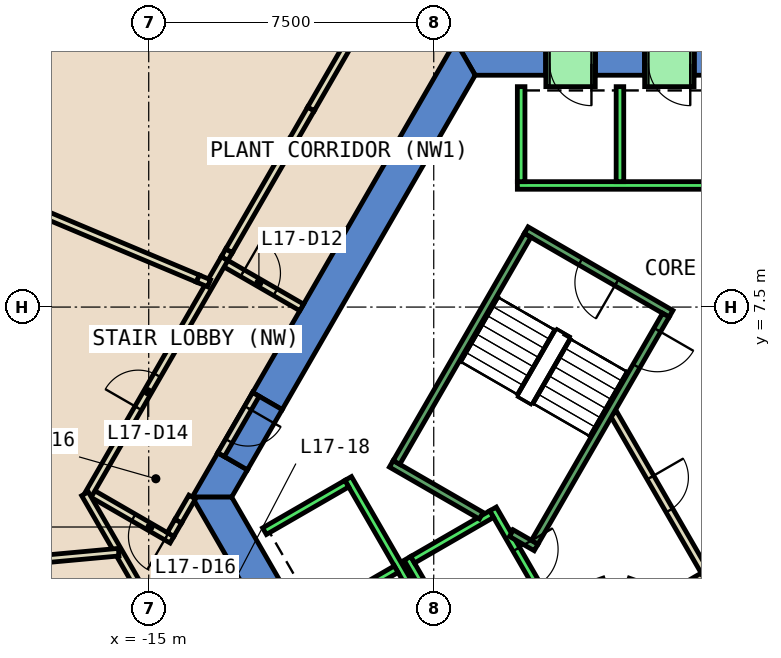
"""IFC4 building model, lengths in metres.
Left out: names, types, materials, properties, quantities, classifications, styles, units other than length and angle.
Written with IfcOpenShell. Run it as: python <this file> out.ifc"""

import sys

from ifc_helpers import new_model, si_unit, direction, frame, frame_2d, origin, place, context, subcontext, project, spatial, polyline, rectangle, outline, extrude, element, fill, save


model = new_model("IFC4")
c1 = context("Model", 3, precision=1e-05, world=origin(), true_north=direction((0.0, 1.0)))
c2 = subcontext(c1, "Body", "Model", "MODEL_VIEW")
j1 = project(units=[si_unit("LENGTHUNIT", "METRE"), si_unit("PLANEANGLEUNIT", "RADIAN")], contexts=[c1])
p1 = place(None, origin())
s1 = spatial("IfcSite", under=j1, at=p1, CompositionType="ELEMENT")
p2 = place(p1, origin())
s2 = spatial("IfcBuilding", under=s1, at=p2, CompositionType="ELEMENT")
p3 = place(p2, frame((0.0, 0.0, 81.2)))
s3 = spatial("IfcBuildingStorey", under=s2, at=p3, CompositionType="ELEMENT", Elevation=81.2)
p4 = place(p3, frame((0.0, 0.0, -0.6)))
e1 = element("IfcWall", 1, at=p4, inside=s3, PredefinedType="SHEAR", context=c2, shape_type="SweptSolid", body=[
    extrude(outline(polyline([(-0.65, 14.5), (-0.65, 13.6), (0.65, 13.6), (0.65, 14.5), (-0.65, 14.5)])), origin(), (0.0, 0.0, 1.0), 5.4),
])
p5 = place(p3, frame((0.0, 0.0, -0.6)))
e2 = element("IfcWall", 2, at=p5, inside=s3, PredefinedType="SHEAR", context=c2, shape_type="SweptSolid", body=[
    extrude(outline(polyline([(-3.25, 14.5), (-3.25, 13.6), (-1.95, 13.6), (-1.95, 14.5), (-3.25, 14.5)])), origin(), (0.0, 0.0, 1.0), 5.4),
])
p6 = place(p3, frame((0.0, 0.0, -0.6)))
e3 = element("IfcWall", 3, at=p6, inside=s3, PredefinedType="SHEAR", context=c2, shape_type="SweptSolid", body=[
    extrude(outline(polyline([(-4.55, 13.6), (-4.55, 14.5), (-6.928, 14.5), (-6.409, 13.6), (-4.55, 13.6)])), origin(), (0.0, 0.0, 1.0), 5.4),
])
p7 = place(p3, frame((0.0, 0.0, 3.6)))
e4 = element("IfcWall", 4, at=p7, inside=s3, PredefinedType="SHEAR", context=c2, shape_type="SweptSolid", body=[
    extrude(outline(polyline([(-1.95, 14.5), (-1.95, 13.6), (-0.65, 13.6), (-0.65, 14.5), (-1.95, 14.5)])), origin(), (0.0, 0.0, 1.0), 1.2),
])
p8 = place(p3, frame((0.0, 0.0, 3.6)))
e5 = element("IfcWall", 5, at=p8, inside=s3, PredefinedType="SHEAR", context=c2, shape_type="SweptSolid", body=[
    extrude(outline(polyline([(-4.55, 14.5), (-4.55, 13.6), (-3.25, 13.6), (-3.25, 14.5), (-4.55, 14.5)])), origin(), (0.0, 0.0, 1.0), 1.2),
])
p9 = place(p3, frame((0.0, 0.0, -0.6)))
e6 = element("IfcWall", 6, at=p9, inside=s3, PredefinedType="SHEAR", context=c2, shape_type="SweptSolid", body=[
    extrude(outline(polyline([(-12.267, 5.252), (-11.488, 4.802), (-6.409, 13.6), (-6.928, 14.5), (-12.267, 5.252)])), origin(), (0.0, 0.0, 1.0), 5.4),
])
p10 = place(p3, frame((0.0, 0.0, -0.6)))
e7 = element("IfcWall", 7, at=p10, inside=s3, PredefinedType="SHEAR", context=c2, shape_type="SweptSolid", body=[
    extrude(outline(polyline([(-12.403, 3.217), (-13.182, 3.667), (-13.856, 2.5), (-12.817, 2.5), (-12.403, 3.217)])), origin(), (0.0, 0.0, 1.0), 5.4),
])
p11 = place(p3, frame((0.0, 0.0, 3.6)))
e8 = element("IfcWall", 8, at=p11, inside=s3, PredefinedType="SHEAR", context=c2, shape_type="SweptSolid", body=[
    extrude(outline(polyline([(-13.182, 3.667), (-12.403, 3.217), (-11.488, 4.802), (-12.267, 5.252), (-13.182, 3.667)])), origin(), (0.0, 0.0, 1.0), 1.2),
])
p12 = place(p3, frame((0.0, 0.0, -0.6)))
e9 = element("IfcWall", 9, at=p12, inside=s3, PredefinedType="SHEAR", context=c2, shape_type="SweptSolid", body=[
    extrude(outline(polyline([(-13.856, 2.5), (-6.928, -9.5), (-6.409, -8.6), (-12.817, 2.5), (-13.856, 2.5)])), origin(), (0.0, 0.0, 1.0), 5.4),
])
p13 = place(p3, frame((-0.52, -1.0, 0.0), z_axis=(0.0, 0.0, 1.0), x_axis=(0.50011622646, 0.865958290007, 0.0)))
e10 = element("IfcWall", 10, at=p13, inside=s3, PredefinedType="PARTITIONING", context=c2, shape_type="SweptSolid", body=[
    extrude(rectangle(XDim=4.991, YDim=0.2, at=frame_2d((2.496, 0.0))), origin(), (0.0, 0.0, 1.0), 4.8),
])
p14 = place(p13, frame((1.945, 0.0, 0.0)))
e11 = element("IfcOpeningElement", 11, at=p14, cuts=e10, PredefinedType="OPENING", context=c2, shape_type="SweptSolid", body=[
    extrude(rectangle(XDim=1.0, YDim=2.1, at=frame_2d((0.5, 1.05))), frame((0.0, 0.11, 0.0), z_axis=(0.0, -1.0, 0.0), x_axis=(1.0, 0.0, 0.0)), (0.0, 0.0, 1.0), 0.22),
])
p15 = place(p3, frame((-0.412, 0.414, 0.0), z_axis=(0.0, 0.0, 1.0), x_axis=(-0.866017369001, -0.500013916395, 0.0)))
e12 = element("IfcWall", 12, at=p15, inside=s3, PredefinedType="PARTITIONING", context=c2, shape_type="SweptSolid", body=[
    extrude(rectangle(XDim=1.45, YDim=0.2, at=frame_2d((0.725, 0.0))), origin(), (0.0, 0.0, 1.0), 4.8),
])
p16 = place(p3, frame((-2.07, 0.16, 0.0), z_axis=(0.0, 0.0, 1.0), x_axis=(-0.942199461132, 0.335052496547, 0.0)))
e13 = element("IfcWall", 13, at=p16, inside=s3, PredefinedType="PARTITIONING", context=c2, shape_type="SweptSolid", body=[
    extrude(rectangle(XDim=0.337, YDim=0.2, at=frame_2d((0.169, 0.0))), origin(), (0.0, 0.0, 1.0), 4.8),
])
p17 = place(p3, frame((-3.012, 0.273, 0.0), z_axis=(0.0, 0.0, 1.0), x_axis=(-0.942280615813, -0.334824194261, 0.0)))
e14 = element("IfcWall", 14, at=p17, inside=s3, PredefinedType="PARTITIONING", context=c2, shape_type="SweptSolid", body=[
    extrude(rectangle(XDim=0.338, YDim=0.2, at=frame_2d((0.169, 0.0))), origin(), (0.0, 0.0, 1.0), 4.8),
])
p18 = place(p3, frame((-2.771, 4.7, 0.0), z_axis=(0.0, 0.0, 1.0), x_axis=(0.499969479948, -0.866043023828, 0.0)))
e15 = element("IfcWall", 15, at=p18, inside=s3, PredefinedType="PARTITIONING", context=c2, shape_type="SweptSolid", body=[
    extrude(rectangle(XDim=4.99, YDim=0.2, at=frame_2d((2.495, 0.0))), origin(), (0.0, 0.0, 1.0), 4.8),
])
p19 = place(p18, frame((1.945, 0.0, 0.0)))
e16 = element("IfcOpeningElement", 16, at=p19, cuts=e15, PredefinedType="OPENING", context=c2, shape_type="SweptSolid", body=[
    extrude(rectangle(XDim=1.0, YDim=2.1, at=frame_2d((0.5, 1.05))), frame((0.0, 0.11, 0.0), z_axis=(0.0, -1.0, 0.0), x_axis=(1.0, 0.0, 0.0)), (0.0, 0.0, 1.0), 0.22),
])
p20 = place(p3, frame((-13.053, 8.691, 0.0), z_axis=(0.0, 0.0, 1.0), x_axis=(0.865973769406, -0.500089422704, 0.0)))
e17 = element("IfcWall", 17, at=p20, inside=s3, PredefinedType="PARTITIONING", context=c2, shape_type="SweptSolid", body=[
    extrude(rectangle(XDim=2.399, YDim=0.2, at=frame_2d((1.2, 0.0))), origin(), (0.0, 0.0, 1.0), 2.4),
])
p21 = place(p20, frame((0.6, 0.0, 0.0)))
e18 = element("IfcOpeningElement", 18, at=p21, cuts=e17, PredefinedType="OPENING", context=c2, shape_type="SweptSolid", body=[
    extrude(rectangle(XDim=1.0, YDim=2.1, at=frame_2d((0.5, 1.05))), frame((0.0, 0.11, 0.0), z_axis=(0.0, -1.0, 0.0), x_axis=(1.0, 0.0, 0.0)), (0.0, 0.0, 1.0), 0.22),
])
p22 = place(p3, frame((-13.856, 2.501, 0.0), z_axis=(0.0, 0.0, 1.0), x_axis=(-0.500327511442, -0.865836232376, 0.0)))
e19 = element("IfcWall", 19, at=p22, inside=s3, PredefinedType="PARTITIONING", context=c2, shape_type="SweptSolid", body=[
    extrude(rectangle(XDim=0.733, YDim=0.2, at=frame_2d((0.367, 0.0))), origin(), (0.0, 0.0, 1.0), 4.8),
])
p23 = place(p3, frame((-14.388, 1.379, 0.0), z_axis=(0.0, 0.0, 1.0), x_axis=(-0.866022959057, 0.500004234368, 0.0)))
e20 = element("IfcWall", 20, at=p23, inside=s3, PredefinedType="PARTITIONING", context=c2, shape_type="SweptSolid", body=[
    extrude(rectangle(XDim=2.5, YDim=0.2, at=frame_2d((1.25, 0.0))), origin(), (0.0, 0.0, 1.0), 4.8),
])
p24 = place(p23, frame((0.168, 0.0, 0.0)))
e21 = element("IfcOpeningElement", 21, at=p24, cuts=e20, PredefinedType="OPENING", context=c2, shape_type="SweptSolid", body=[
    extrude(rectangle(XDim=1.0, YDim=2.1, at=frame_2d((0.5, 1.05))), frame((0.0, 0.11, 0.0), z_axis=(0.0, -1.0, 0.0), x_axis=(1.0, 0.0, 0.0)), (0.0, 0.0, 1.0), 0.22),
])
p25 = place(p3, frame((-16.603, 2.542, 0.0), z_axis=(0.0, 0.0, 1.0), x_axis=(0.499968011863, 0.866043871356, 0.0)))
e22 = element("IfcWall", 22, at=p25, inside=s3, PredefinedType="PARTITIONING", context=c2, shape_type="SweptSolid", body=[
    extrude(rectangle(XDim=7.201, YDim=0.2, at=frame_2d((3.6, 0.0))), origin(), (0.0, 0.0, 1.0), 4.8),
])
p26 = place(p25, frame((2.654, 0.0, 0.0)))
e23 = element("IfcOpeningElement", 23, at=p26, cuts=e22, PredefinedType="OPENING", context=c2, shape_type="SweptSolid", body=[
    extrude(rectangle(XDim=1.0, YDim=2.1, at=frame_2d((0.5, 1.05))), frame((0.0, 0.11, 0.0), z_axis=(0.0, -1.0, 0.0), x_axis=(1.0, 0.0, 0.0)), (0.0, 0.0, 1.0), 0.22),
])
p27 = place(p3, frame((-13.003, 8.778, 0.0), z_axis=(0.0, 0.0, 1.0), x_axis=(0.49939147885, 0.866376448694, 0.0)))
e24 = element("IfcWall", 24, at=p27, inside=s3, PredefinedType="PARTITIONING", context=c2, shape_type="SweptSolid", body=[
    extrude(rectangle(XDim=0.234, YDim=0.2, at=frame_2d((0.117, 0.0))), origin(), (0.0, 0.0, 1.0), 2.4),
])
p28 = place(p3, frame((-12.471, -4.7, 0.0), z_axis=(0.0, 0.0, 1.0), x_axis=(-0.49990916997, 0.866077838176, 0.0)))
e25 = element("IfcWall", 25, at=p28, inside=s3, PredefinedType="PARTITIONING", context=c2, shape_type="SweptSolid", body=[
    extrude(rectangle(XDim=8.414, YDim=0.2, at=frame_2d((4.207, 0.0))), origin(), (0.0, 0.0, 1.0), 4.8),
])
p29 = place(p28, frame((4.362, 0.0, 0.0)))
e26 = element("IfcOpeningElement", 26, at=p29, cuts=e25, PredefinedType="OPENING", context=c2, shape_type="SweptSolid", body=[
    extrude(rectangle(XDim=1.0, YDim=2.1, at=frame_2d((0.5, 1.05))), frame((0.0, 0.11, 0.0), z_axis=(0.0, -1.0, 0.0), x_axis=(1.0, 0.0, 0.0)), (0.0, 0.0, 1.0), 0.22),
])
p30 = place(p3, frame((-15.791, 1.051, 0.0), z_axis=(0.0, 0.0, 1.0), x_axis=(-0.99580964223, -0.091450294928, 0.0)))
e27 = element("IfcWall", 27, at=p30, inside=s3, PredefinedType="PARTITIONING", context=c2, shape_type="SweptSolid", body=[
    extrude(rectangle(XDim=18.557, YDim=0.2, at=frame_2d((9.278, 0.0))), origin(), (0.0, 0.0, 1.0), 2.4),
])
p31 = place(p3, frame((-12.181, 5.202, 0.0), z_axis=(0.0, 0.0, 1.0), x_axis=(-0.500215337403, -0.865901042976, 0.0)))
e28 = element("IfcWall", 28, at=p31, inside=s3, PredefinedType="PARTITIONING", context=c2, shape_type="SweptSolid", body=[
    extrude(rectangle(XDim=1.829, YDim=0.2, at=frame_2d((0.915, 0.0))), origin(), (0.0, 0.0, 1.0), 2.4),
])
p32 = place(p31, frame((0.415, 0.0, 0.0)))
e29 = element("IfcOpeningElement", 29, at=p32, cuts=e28, PredefinedType="OPENING", context=c2, shape_type="SweptSolid", body=[
    extrude(rectangle(XDim=1.0, YDim=2.1, at=frame_2d((0.5, 1.05))), frame((0.0, 0.11, 0.0), z_axis=(0.0, -1.0, 0.0), x_axis=(1.0, 0.0, 0.0)), (0.0, 0.0, 1.0), 0.22),
])
p33 = place(p3, frame((-14.223, 1.866, 0.0), z_axis=(0.0, 0.0, 1.0), x_axis=(-0.500297731093, -0.865853440406, 0.0)))
e30 = element("IfcWall", 30, at=p33, inside=s3, PredefinedType="PARTITIONING", context=c2, shape_type="SweptSolid", body=[
    extrude(rectangle(XDim=0.404, YDim=0.2, at=frame_2d((0.202, 0.0))), origin(), (0.0, 0.0, 1.0), 2.4),
])
p34 = place(p3, frame((-12.886, 8.981, 0.0), z_axis=(0.0, 0.0, 1.0), x_axis=(0.500018952895, 0.866014461049, 0.0)))
e31 = element("IfcWall", 31, at=p34, inside=s3, PredefinedType="PARTITIONING", context=c2, shape_type="SweptSolid", body=[
    extrude(rectangle(XDim=3.35, YDim=0.2, at=frame_2d((1.675, 0.0))), origin(), (0.0, 0.0, 1.0), 4.8),
])
p35 = place(p3, frame((-11.211, 11.882, 0.0), z_axis=(0.0, 0.0, 1.0), x_axis=(0.499693115345, 0.866202511239, 0.0)))
e32 = element("IfcWall", 32, at=p35, inside=s3, PredefinedType="PARTITIONING", context=c2, shape_type="SweptSolid", body=[
    extrude(rectangle(XDim=0.96, YDim=0.2, at=frame_2d((0.48, 0.0))), origin(), (0.0, 0.0, 1.0), 2.4),
])
p36 = place(p3, frame((-10.731, 12.714, 0.0), z_axis=(0.0, 0.0, 1.0), x_axis=(0.500043078269, 0.866000531106, 0.0)))
e33 = element("IfcWall", 33, at=p36, inside=s3, PredefinedType="PARTITIONING", context=c2, shape_type="SweptSolid", body=[
    extrude(rectangle(XDim=3.296, YDim=0.2, at=frame_2d((1.648, 0.0))), origin(), (0.0, 0.0, 1.0), 4.8),
])
p37 = place(p3, frame((-25.73, 13.293, 0.0), z_axis=(0.0, 0.0, 1.0), x_axis=(0.922164650021, -0.386797567535, 0.0)))
e34 = element("IfcWall", 34, at=p37, inside=s3, PredefinedType="PARTITIONING", context=c2, shape_type="SweptSolid", body=[
    extrude(rectangle(XDim=13.038, YDim=0.2, at=frame_2d((6.519, 0.0))), origin(), (0.0, 0.0, 1.0), 4.8),
])
p38 = place(p3, frame((-13.707, 8.25, 0.0), z_axis=(0.0, 0.0, 1.0), x_axis=(0.921982105607, -0.387232484355, 0.0)))
e35 = element("IfcWall", 35, at=p38, inside=s3, PredefinedType="PARTITIONING", context=c2, shape_type="SweptSolid", body=[
    extrude(rectangle(XDim=0.318, YDim=0.2, at=frame_2d((0.159, 0.0))), origin(), (0.0, 0.0, 1.0), 2.4),
])
p39 = place(p3, frame((5.3, 10.7, 0.0), z_axis=(0.0, 0.0, 1.0), x_axis=(-1.0, 0.0, 0.0)))
e36 = element("IfcWall", 36, at=p39, inside=s3, PredefinedType="STANDARD", context=c2, shape_type="SweptSolid", body=[
    extrude(rectangle(XDim=10.6, YDim=0.2, at=frame_2d((5.3, 0.0))), origin(), (0.0, 0.0, 1.0), 4.8),
])
for number, where, z_axis, x_axis in (
    (37, (-2.6, 10.8, 0.0), (0.0, 0.0, 1.0), (0.0, 1.0, 0.0)),
    (38, (-5.2, 10.8, 0.0), (0.0, 0.0, 1.0), (0.0, 1.0, 0.0)),
):
    element("IfcWall", number, at=place(p3, frame(where, z_axis=z_axis, x_axis=x_axis)), inside=s3, PredefinedType="STANDARD", context=c2, shape_type="SweptSolid", body=[
        extrude(rectangle(XDim=2.5, YDim=0.2, at=frame_2d((1.25, 0.0))), origin(), (0.0, 0.0, 1.0), 4.8),
    ])
p40 = place(p3, frame((-5.94, 2.188, 0.0), z_axis=(0.0, 0.0, 1.0), x_axis=(0.49994636267, -0.866056369097, 0.0)))
e39 = element("IfcWall", 39, at=p40, inside=s3, PredefinedType="STANDARD", context=c2, shape_type="SweptSolid", body=[
    extrude(rectangle(XDim=2.8, YDim=0.2, at=frame_2d((1.4, 0.0))), origin(), (0.0, 0.0, 1.0), 4.8),
])
p41 = place(p40, frame((1.225, 0.0, 0.0)))
e40 = element("IfcOpeningElement", 40, at=p41, cuts=e39, PredefinedType="OPENING", context=c2, shape_type="SweptSolid", body=[
    extrude(rectangle(XDim=1.1, YDim=2.1, at=frame_2d((0.55, 1.05))), frame((0.0, 0.11, 0.0), z_axis=(0.0, -1.0, 0.0), x_axis=(1.0, 0.0, 0.0)), (0.0, 0.0, 1.0), 0.22),
])
p42 = place(p3, frame((-8.192, 0.888, 0.0), z_axis=(0.0, 0.0, 1.0), x_axis=(0.49994636267, -0.866056369097, 0.0)))
e41 = element("IfcWall", 41, at=p42, inside=s3, PredefinedType="STANDARD", context=c2, shape_type="SweptSolid", body=[
    extrude(rectangle(XDim=2.8, YDim=0.2, at=frame_2d((1.4, 0.0))), origin(), (0.0, 0.0, 1.0), 4.8),
])
p43 = place(p3, frame((-5.977, 2.052, 0.0), z_axis=(0.0, 0.0, 1.0), x_axis=(-0.865973769406, -0.500089422704, 0.0)))
e42 = element("IfcWall", 42, at=p43, inside=s3, PredefinedType="STANDARD", context=c2, shape_type="SweptSolid", body=[
    extrude(rectangle(XDim=2.399, YDim=0.2, at=frame_2d((1.2, 0.0))), origin(), (0.0, 0.0, 1.0), 4.8),
])
p44 = place(p3, frame((-9.751, 2.99, 0.0), z_axis=(0.0, 0.0, 1.0), x_axis=(0.50000090737, -0.866024879913, 0.0)))
e43 = element("IfcWall", 43, at=p44, inside=s3, PredefinedType="STANDARD", context=c2, shape_type="SweptSolid", body=[
    extrude(rectangle(XDim=10.6, YDim=0.2, at=frame_2d((5.3, 0.0))), origin(), (0.0, 0.0, 1.0), 4.8),
])
p45 = place(p3, frame((-9.788, 2.853, 0.0), z_axis=(0.0, 0.0, 1.0), x_axis=(-0.865998541277, -0.500046524342, 0.0)))
e44 = element("IfcWall", 44, at=p45, inside=s3, PredefinedType="STANDARD", context=c2, shape_type="SweptSolid", body=[
    extrude(rectangle(XDim=2.5, YDim=0.2, at=frame_2d((1.25, 0.0))), origin(), (0.0, 0.0, 1.0), 4.8),
])
p46 = place(p3, frame((-8.488, 0.602, 0.0), z_axis=(0.0, 0.0, 1.0), x_axis=(-0.866022959057, -0.500004234368, 0.0)))
e45 = element("IfcWall", 45, at=p46, inside=s3, PredefinedType="STANDARD", context=c2, shape_type="SweptSolid", body=[
    extrude(rectangle(XDim=2.5, YDim=0.2, at=frame_2d((1.25, 0.0))), origin(), (0.0, 0.0, 1.0), 4.8),
])
p47 = place(p3, frame((-0.65, 13.9, 0.0), z_axis=(0.0, 0.0, 1.0), x_axis=(-1.0, 0.0, 0.0)))
e46 = element("IfcWall", 46, at=p47, inside=s3, PredefinedType="STANDARD", context=c2, shape_type="SweptSolid", body=[
    extrude(rectangle(XDim=1.3, YDim=1.2, at=frame_2d((0.65, 0.0))), origin(), (0.0, 0.0, 1.0), 2.4),
])
p48 = place(p47, frame((0.1, 0.0, 0.0)))
e47 = element("IfcOpeningElement", 47, at=p48, cuts=e46, PredefinedType="OPENING", context=c2, shape_type="SweptSolid", body=[
    extrude(rectangle(XDim=1.1, YDim=2.3, at=frame_2d((0.55, 1.15))), frame((0.0, 0.61, 0.0), z_axis=(0.0, -1.0, 0.0), x_axis=(1.0, 0.0, 0.0)), (0.0, 0.0, 1.0), 1.22),
])
p49 = place(p3, frame((-3.25, 13.9, 0.0), z_axis=(0.0, 0.0, 1.0), x_axis=(-1.0, 0.0, 0.0)))
e48 = element("IfcWall", 48, at=p49, inside=s3, PredefinedType="STANDARD", context=c2, shape_type="SweptSolid", body=[
    extrude(rectangle(XDim=1.3, YDim=1.2, at=frame_2d((0.65, 0.0))), origin(), (0.0, 0.0, 1.0), 2.4),
])
p50 = place(p49, frame((0.1, 0.0, 0.0)))
e49 = element("IfcOpeningElement", 49, at=p50, cuts=e48, PredefinedType="OPENING", context=c2, shape_type="SweptSolid", body=[
    extrude(rectangle(XDim=1.1, YDim=2.3, at=frame_2d((0.55, 1.15))), frame((0.0, 0.61, 0.0), z_axis=(0.0, -1.0, 0.0), x_axis=(1.0, 0.0, 0.0)), (0.0, 0.0, 1.0), 1.22),
])
p51 = place(p3, frame((-1.256, 7.324, 0.0), z_axis=(0.0, 0.0, 1.0), x_axis=(-0.866046073146, 0.499964197906, 0.0)))
e50 = element("IfcWall", 50, at=p51, inside=s3, PredefinedType="STANDARD", context=c2, shape_type="SweptSolid", body=[
    extrude(rectangle(XDim=4.4, YDim=0.2, at=frame_2d((2.2, 0.0))), origin(), (0.0, 0.0, 1.0), 4.8),
])
p52 = place(p51, frame((1.65, 0.0, 0.0)))
e51 = element("IfcOpeningElement", 51, at=p52, cuts=e50, PredefinedType="OPENING", context=c2, shape_type="SweptSolid", body=[
    extrude(rectangle(XDim=1.1, YDim=2.2, at=frame_2d((0.55, 1.1))), frame((0.0, 0.11, 0.0), z_axis=(0.0, -1.0, 0.0), x_axis=(1.0, 0.0, 0.0)), (0.0, 0.0, 1.0), 0.22),
])
p53 = place(p3, frame((-6.25, 2.01, 0.0), z_axis=(0.0, 0.0, 1.0), x_axis=(-0.86611865017, 0.499838457731, 0.0)))
e52 = element("IfcWall", 52, at=p53, inside=s3, PredefinedType="STANDARD", context=c2, shape_type="SweptSolid", body=[
    extrude(rectangle(XDim=2.733, YDim=0.2, at=frame_2d((1.366, 0.0))), origin(), (0.0, 0.0, 1.0), 4.8),
])
p54 = place(p3, frame((-4.806, 1.176, 0.0), z_axis=(0.0, 0.0, 1.0), x_axis=(-0.866558586415, 0.499075361355, 0.0)))
e53 = element("IfcWall", 53, at=p54, inside=s3, PredefinedType="STANDARD", context=c2, shape_type="SweptSolid", body=[
    extrude(rectangle(XDim=0.751, YDim=0.2, at=frame_2d((0.376, 0.0))), origin(), (0.0, 0.0, 1.0), 4.8),
])
p55 = place(p3, frame((-1.393, 7.288, 0.0), z_axis=(0.0, 0.0, 1.0), x_axis=(-0.499963383562, -0.866046543262, 0.0)))
e54 = element("IfcWall", 54, at=p55, inside=s3, PredefinedType="STANDARD", context=c2, shape_type="SweptSolid", body=[
    extrude(rectangle(XDim=6.9, YDim=0.2, at=frame_2d((3.45, 0.0))), origin(), (0.0, 0.0, 1.0), 4.8),
])
p56 = place(p55, frame((0.45, 0.0, 0.0)))
e55 = element("IfcOpeningElement", 55, at=p56, cuts=e54, PredefinedType="OPENING", context=c2, shape_type="SweptSolid", body=[
    extrude(rectangle(XDim=1.1, YDim=2.2, at=frame_2d((0.55, 1.1))), frame((0.0, 0.11, 0.0), z_axis=(0.0, -1.0, 0.0), x_axis=(1.0, 0.0, 0.0)), (0.0, 0.0, 1.0), 0.22),
])
p57 = place(p3, frame((-5.03, 9.388, 0.0), z_axis=(0.0, 0.0, 1.0), x_axis=(-0.499978703459, -0.866037698999, 0.0)))
e56 = element("IfcWall", 56, at=p57, inside=s3, PredefinedType="STANDARD", context=c2, shape_type="SweptSolid", body=[
    extrude(rectangle(XDim=6.9, YDim=0.2, at=frame_2d((3.45, 0.0))), origin(), (0.0, 0.0, 1.0), 4.8),
])
p58 = place(p21, origin())
e57 = element("IfcDoor", 57, at=p58, inside=s3, OperationType="SINGLE_SWING_RIGHT", PredefinedType="DOOR", context=c2, shape_type="SweptSolid", body=[
    extrude(rectangle(XDim=1.0, YDim=2.1, at=frame_2d((0.5, 1.05))), frame((0.0, 0.025, 0.0), z_axis=(0.0, -1.0, 0.0), x_axis=(1.0, 0.0, 0.0)), (0.0, 0.0, 1.0), 0.05),
])
fill(e18, e57)
p59 = place(p24, origin())
e58 = element("IfcDoor", 58, at=p59, inside=s3, OperationType="SINGLE_SWING_LEFT", PredefinedType="DOOR", context=c2, shape_type="SweptSolid", body=[
    extrude(rectangle(XDim=1.0, YDim=2.1, at=frame_2d((0.5, 1.05))), frame((0.0, 0.025, 0.0), z_axis=(0.0, -1.0, 0.0), x_axis=(1.0, 0.0, 0.0)), (0.0, 0.0, 1.0), 0.05),
])
fill(e21, e58)
p60 = place(p26, origin())
e59 = element("IfcDoor", 59, at=p60, inside=s3, OperationType="SINGLE_SWING_RIGHT", PredefinedType="DOOR", context=c2, shape_type="SweptSolid", body=[
    extrude(rectangle(XDim=1.0, YDim=2.1, at=frame_2d((0.5, 1.05))), frame((0.0, 0.025, 0.0), z_axis=(0.0, -1.0, 0.0), x_axis=(1.0, 0.0, 0.0)), (0.0, 0.0, 1.0), 0.05),
])
fill(e23, e59)
p61 = place(p19, origin())
e60 = element("IfcDoor", 60, at=p61, inside=s3, OperationType="SINGLE_SWING_RIGHT", PredefinedType="DOOR", context=c2, shape_type="SweptSolid", body=[
    extrude(rectangle(XDim=1.0, YDim=2.1, at=frame_2d((0.5, 1.05))), frame((0.0, 0.025, 0.0), z_axis=(0.0, -1.0, 0.0), x_axis=(1.0, 0.0, 0.0)), (0.0, 0.0, 1.0), 0.05),
])
fill(e16, e60)
p62 = place(p32, origin())
e61 = element("IfcDoor", 61, at=p62, inside=s3, OperationType="SINGLE_SWING_LEFT", PredefinedType="DOOR", context=c2, shape_type="SweptSolid", body=[
    extrude(rectangle(XDim=1.0, YDim=2.1, at=frame_2d((0.5, 1.05))), frame((0.0, 0.025, 0.0), z_axis=(0.0, -1.0, 0.0), x_axis=(1.0, 0.0, 0.0)), (0.0, 0.0, 1.0), 0.05),
])
fill(e29, e61)
p63 = place(p48, origin())
e62 = element("IfcDoor", 62, at=p63, inside=s3, OperationType="SLIDING_TO_LEFT", PredefinedType="DOOR", context=c2, shape_type="SweptSolid", body=[
    extrude(rectangle(XDim=1.1, YDim=2.3, at=frame_2d((0.55, 1.15))), frame((0.0, 0.025, 0.0), z_axis=(0.0, -1.0, 0.0), x_axis=(1.0, 0.0, 0.0)), (0.0, 0.0, 1.0), 0.05),
])
fill(e47, e62)
p64 = place(p50, origin())
e63 = element("IfcDoor", 63, at=p64, inside=s3, OperationType="SLIDING_TO_LEFT", PredefinedType="DOOR", context=c2, shape_type="SweptSolid", body=[
    extrude(rectangle(XDim=1.1, YDim=2.3, at=frame_2d((0.55, 1.15))), frame((0.0, 0.025, 0.0), z_axis=(0.0, -1.0, 0.0), x_axis=(1.0, 0.0, 0.0)), (0.0, 0.0, 1.0), 0.05),
])
fill(e49, e63)
p65 = place(p41, origin())
e64 = element("IfcDoor", 64, at=p65, inside=s3, OperationType="SLIDING_TO_LEFT", PredefinedType="DOOR", context=c2, shape_type="SweptSolid", body=[
    extrude(rectangle(XDim=1.1, YDim=2.1, at=frame_2d((0.55, 1.05))), frame((0.0, 0.025, 0.0), z_axis=(0.0, -1.0, 0.0), x_axis=(1.0, 0.0, 0.0)), (0.0, 0.0, 1.0), 0.05),
])
fill(e40, e64)
p66 = place(p56, origin())
e65 = element("IfcDoor", 65, at=p66, inside=s3, OperationType="SINGLE_SWING_LEFT", PredefinedType="DOOR", context=c2, shape_type="SweptSolid", body=[
    extrude(rectangle(XDim=1.1, YDim=2.2, at=frame_2d((0.55, 1.1))), frame((0.0, 0.025, 0.0), z_axis=(0.0, -1.0, 0.0), x_axis=(1.0, 0.0, 0.0)), (0.0, 0.0, 1.0), 0.05),
])
fill(e55, e65)
p67 = place(p52, origin())
e66 = element("IfcDoor", 66, at=p67, inside=s3, OperationType="SINGLE_SWING_LEFT", PredefinedType="DOOR", context=c2, shape_type="SweptSolid", body=[
    extrude(rectangle(XDim=1.1, YDim=2.2, at=frame_2d((0.55, 1.1))), frame((0.0, 0.025, 0.0), z_axis=(0.0, -1.0, 0.0), x_axis=(1.0, 0.0, 0.0)), (0.0, 0.0, 1.0), 0.05),
])
fill(e51, e66)
save(model, sys.argv[1])
